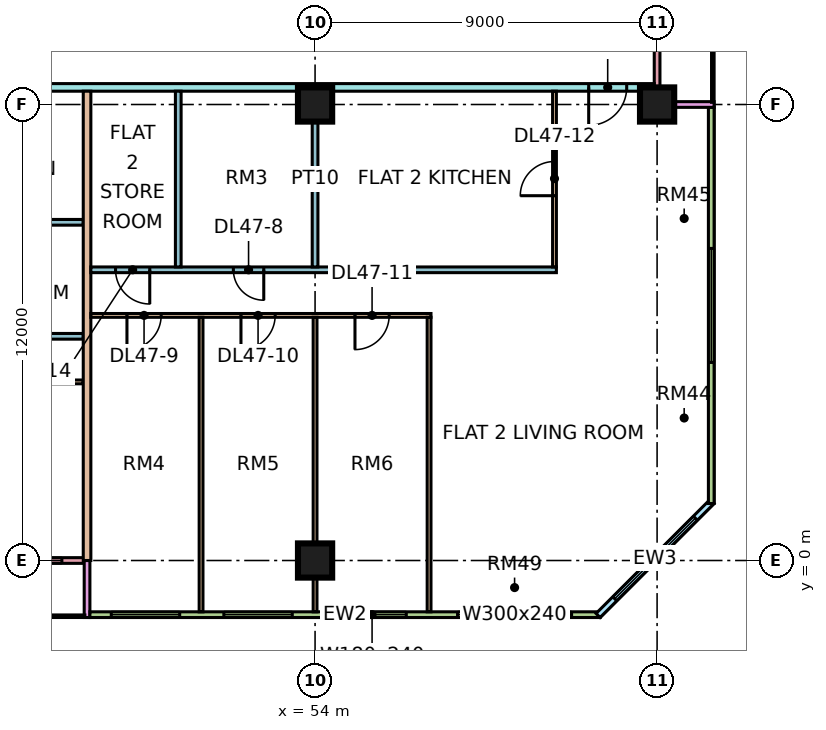
"""IFC4 building model, lengths in metres.
Left out: names, types, materials, properties, quantities, classifications, styles, units other than length and angle.
Written with IfcOpenShell. Run it as: python <this file> out.ifc"""

import sys

from ifc_helpers import new_model, si_unit, direction, frame, frame_2d, origin, origin_2d, place, context, subcontext, project, spatial, rectangle, extrude, element, fill, save


model = new_model("IFC4")
c1 = context("Model", 3, precision=1e-05, world=origin(), true_north=direction((0.0, 1.0)))
c2 = subcontext(c1, "Body", "Model", "MODEL_VIEW")
j1 = project(units=[si_unit("LENGTHUNIT", "METRE"), si_unit("PLANEANGLEUNIT", "RADIAN")], contexts=[c1])
p1 = place(None, origin())
s1 = spatial("IfcSite", under=j1, at=p1, CompositionType="ELEMENT")
p2 = place(p1, origin())
s2 = spatial("IfcBuilding", under=s1, at=p2, CompositionType="ELEMENT")
p3 = place(p2, frame((0.0, 0.0, 202.4)))
s3 = spatial("IfcBuildingStorey", under=s2, at=p3, CompositionType="ELEMENT", Elevation=202.4)
for number, where, z_axis, x_axis in (
    (1, (54.0, 0.0, 0.0), (0.0, 0.0, 1.0), (1.0, 0.0, 0.0)),
    (2, (54.0, 12.0, 0.0), (0.0, 0.0, 1.0), (1.0, 0.0, 0.0)),
    (3, (63.0, 12.0, 0.0), (0.0, 0.0, 1.0), (1.0, 0.0, 0.0)),
):
    element("IfcColumn", number, at=place(p3, frame(where, z_axis=z_axis, x_axis=x_axis)), inside=s3, PredefinedType="COLUMN", context=c2, shape_type="SweptSolid", body=[
        extrude(rectangle(XDim=0.9, YDim=0.9, at=origin_2d()), origin(), (0.0, 0.0, 1.0), 3.75),
    ])
p4 = place(p3, frame((36.075, 0.0, 0.0), z_axis=(0.0, 0.0, 1.0), x_axis=(1.0, 0.0, 0.0)))
e4 = element("IfcWall", 4, at=p4, inside=s3, PredefinedType="SOLIDWALL", context=c2, shape_type="SweptSolid", body=[
    extrude(rectangle(XDim=11.85, YDim=0.15, at=frame_2d((5.925, 0.0))), origin(), (0.0, 0.0, 1.0), 3.3),
])
p5 = place(p4, frame((1.1, 0.0, 0.0)))
e5 = element("IfcOpeningElement", 5, at=p5, cuts=e4, PredefinedType="OPENING", context=c2, shape_type="SweptSolid", body=[
    extrude(rectangle(XDim=1.2, YDim=2.4, at=frame_2d((0.6, 1.2))), frame((0.0, 0.085, 0.0), z_axis=(0.0, -1.0, 0.0), x_axis=(1.0, 0.0, 0.0)), (0.0, 0.0, 1.0), 0.17),
])
p6 = place(p4, frame((4.15, 0.0, 0.45)))
e6 = element("IfcOpeningElement", 6, at=p6, cuts=e4, PredefinedType="OPENING", context=c2, shape_type="SweptSolid", body=[
    extrude(rectangle(XDim=3.0, YDim=2.4, at=frame_2d((1.5, 1.2))), frame((0.0, 0.085, 0.0), z_axis=(0.0, -1.0, 0.0), x_axis=(1.0, 0.0, 0.0)), (0.0, 0.0, 1.0), 0.17),
])
p7 = place(p4, frame((10.062, 0.0, 0.45)))
e7 = element("IfcOpeningElement", 7, at=p7, cuts=e4, PredefinedType="OPENING", context=c2, shape_type="SweptSolid", body=[
    extrude(rectangle(XDim=1.2, YDim=2.4, at=frame_2d((0.6, 1.2))), frame((0.0, 0.085, 0.0), z_axis=(0.0, -1.0, 0.0), x_axis=(1.0, 0.0, 0.0)), (0.0, 0.0, 1.0), 0.17),
])
p8 = place(p3, frame((48.0, -1.5, 0.0), z_axis=(0.0, 0.0, 1.0), x_axis=(0.0, 1.0, 0.0)))
e8 = element("IfcWall", 8, at=p8, inside=s3, PredefinedType="SOLIDWALL", context=c2, shape_type="SweptSolid", body=[
    extrude(rectangle(XDim=1.5, YDim=0.15, at=frame_2d((0.75, 0.0))), origin(), (0.0, 0.0, 1.0), 3.3),
])
p9 = place(p3, frame((48.075, -1.425, 0.0), z_axis=(0.0, 0.0, 1.0), x_axis=(1.0, 0.0, 0.0)))
e9 = element("IfcWall", 9, at=p9, inside=s3, PredefinedType="SOLIDWALL", context=c2, shape_type="SweptSolid", body=[
    extrude(rectangle(XDim=13.425, YDim=0.15, at=frame_2d((6.712, 0.0))), origin(), (0.0, 0.0, 1.0), 3.3),
])
p10 = place(p9, frame((0.562, 0.0, 0.45)))
e10 = element("IfcOpeningElement", 10, at=p10, cuts=e9, PredefinedType="OPENING", context=c2, shape_type="SweptSolid", body=[
    extrude(rectangle(XDim=1.8, YDim=2.4, at=frame_2d((0.9, 1.2))), frame((0.0, 0.085, 0.0), z_axis=(0.0, -1.0, 0.0), x_axis=(1.0, 0.0, 0.0)), (0.0, 0.0, 1.0), 0.17),
])
p11 = place(p9, frame((3.525, 0.0, 0.45)))
e11 = element("IfcOpeningElement", 11, at=p11, cuts=e9, PredefinedType="OPENING", context=c2, shape_type="SweptSolid", body=[
    extrude(rectangle(XDim=1.8, YDim=2.4, at=frame_2d((0.9, 1.2))), frame((0.0, 0.085, 0.0), z_axis=(0.0, -1.0, 0.0), x_axis=(1.0, 0.0, 0.0)), (0.0, 0.0, 1.0), 0.17),
])
p12 = place(p9, frame((6.525, 0.0, 0.45)))
e12 = element("IfcOpeningElement", 12, at=p12, cuts=e9, PredefinedType="OPENING", context=c2, shape_type="SweptSolid", body=[
    extrude(rectangle(XDim=1.8, YDim=2.4, at=frame_2d((0.9, 1.2))), frame((0.0, 0.085, 0.0), z_axis=(0.0, -1.0, 0.0), x_axis=(1.0, 0.0, 0.0)), (0.0, 0.0, 1.0), 0.17),
])
p13 = place(p9, frame((9.675, 0.0, 0.45)))
e13 = element("IfcOpeningElement", 13, at=p13, cuts=e9, PredefinedType="OPENING", context=c2, shape_type="SweptSolid", body=[
    extrude(rectangle(XDim=3.0, YDim=2.4, at=frame_2d((1.5, 1.2))), frame((0.0, 0.085, 0.0), z_axis=(0.0, -1.0, 0.0), x_axis=(1.0, 0.0, 0.0)), (0.0, 0.0, 1.0), 0.17),
])
p14 = place(p3, frame((61.447, -1.447, 0.0), z_axis=(0.0, 0.0, 1.0), x_axis=(0.707106781187, 0.707106781187, 0.0)))
e14 = element("IfcWall", 14, at=p14, inside=s3, PredefinedType="SOLIDWALL", context=c2, shape_type="SweptSolid", body=[
    extrude(rectangle(XDim=4.243, YDim=0.15, at=frame_2d((2.121, 0.0))), origin(), (0.0, 0.0, 1.0), 3.3),
])
p15 = place(p14, frame((0.621, 0.0, 0.45)))
e15 = element("IfcOpeningElement", 15, at=p15, cuts=e14, PredefinedType="OPENING", context=c2, shape_type="SweptSolid", body=[
    extrude(rectangle(XDim=3.0, YDim=2.4, at=frame_2d((1.5, 1.2))), frame((0.0, 0.085, 0.0), z_axis=(0.0, -1.0, 0.0), x_axis=(1.0, 0.0, 0.0)), (0.0, 0.0, 1.0), 0.17),
])
p16 = place(p3, frame((64.425, 1.5, 0.0), z_axis=(0.0, 0.0, 1.0), x_axis=(0.0, 1.0, 0.0)))
e16 = element("IfcWall", 16, at=p16, inside=s3, PredefinedType="SOLIDWALL", context=c2, shape_type="SweptSolid", body=[
    extrude(rectangle(XDim=10.425, YDim=0.15, at=frame_2d((5.212, 0.0))), origin(), (0.0, 0.0, 1.0), 3.3),
])
p17 = place(p16, frame((3.712, 0.0, 0.45)))
e17 = element("IfcOpeningElement", 17, at=p17, cuts=e16, PredefinedType="OPENING", context=c2, shape_type="SweptSolid", body=[
    extrude(rectangle(XDim=3.0, YDim=2.4, at=frame_2d((1.5, 1.2))), frame((0.0, 0.085, 0.0), z_axis=(0.0, -1.0, 0.0), x_axis=(1.0, 0.0, 0.0)), (0.0, 0.0, 1.0), 0.17),
])
p18 = place(p3, frame((63.0, 12.075, 0.0), z_axis=(0.0, 0.0, 1.0), x_axis=(0.0, 1.0, 0.0)))
e18 = element("IfcWall", 18, at=p18, inside=s3, PredefinedType="SOLIDWALL", context=c2, shape_type="SweptSolid", body=[
    extrude(rectangle(XDim=10.35, YDim=0.15, at=frame_2d((5.175, 0.0))), origin(), (0.0, 0.0, 1.0), 3.3),
])
p19 = place(p18, frame((4.125, 0.0, 0.45)))
e19 = element("IfcOpeningElement", 19, at=p19, cuts=e18, PredefinedType="OPENING", context=c2, shape_type="SweptSolid", body=[
    extrude(rectangle(XDim=1.8, YDim=2.4, at=frame_2d((0.9, 1.2))), frame((0.0, 0.085, 0.0), z_axis=(0.0, -1.0, 0.0), x_axis=(1.0, 0.0, 0.0)), (0.0, 0.0, 1.0), 0.17),
])
p20 = place(p18, frame((8.137, 0.0, 0.45)))
e20 = element("IfcOpeningElement", 20, at=p20, cuts=e18, PredefinedType="OPENING", context=c2, shape_type="SweptSolid", body=[
    extrude(rectangle(XDim=1.8, YDim=2.4, at=frame_2d((0.9, 1.2))), frame((0.0, 0.085, 0.0), z_axis=(0.0, -1.0, 0.0), x_axis=(1.0, 0.0, 0.0)), (0.0, 0.0, 1.0), 0.17),
])
p21 = place(p3, frame((64.5, 12.0, 0.0), z_axis=(0.0, 0.0, 1.0), x_axis=(-1.0, 0.0, 0.0)))
e21 = element("IfcWall", 21, at=p21, inside=s3, PredefinedType="SOLIDWALL", context=c2, shape_type="SweptSolid", body=[
    extrude(rectangle(XDim=1.5, YDim=0.15, at=frame_2d((0.75, 0.0))), origin(), (0.0, 0.0, 1.0), 3.3),
])
p22 = place(p3, frame((33.05, 4.7, 0.0), z_axis=(0.0, 0.0, 1.0), x_axis=(1.0, 0.0, 0.0)))
e22 = element("IfcWall", 22, at=p22, inside=s3, PredefinedType="PARTITIONING", context=c2, shape_type="SweptSolid", body=[
    extrude(rectangle(XDim=14.85, YDim=0.1, at=frame_2d((7.425, 0.0))), origin(), (0.0, 0.0, 1.0), 3.3),
])
p23 = place(p22, frame((1.0, 0.0, 0.0)))
e23 = element("IfcOpeningElement", 23, at=p23, cuts=e22, PredefinedType="OPENING", context=c2, shape_type="SweptSolid", body=[
    extrude(rectangle(XDim=0.9, YDim=2.1, at=frame_2d((0.45, 1.05))), frame((0.0, 0.06, 0.0), z_axis=(0.0, -1.0, 0.0), x_axis=(1.0, 0.0, 0.0)), (0.0, 0.0, 1.0), 0.12),
])
p24 = place(p22, frame((4.0, 0.0, 0.0)))
e24 = element("IfcOpeningElement", 24, at=p24, cuts=e22, PredefinedType="OPENING", context=c2, shape_type="SweptSolid", body=[
    extrude(rectangle(XDim=0.9, YDim=2.1, at=frame_2d((0.45, 1.05))), frame((0.0, 0.06, 0.0), z_axis=(0.0, -1.0, 0.0), x_axis=(1.0, 0.0, 0.0)), (0.0, 0.0, 1.0), 0.12),
])
p25 = place(p22, frame((10.0, 0.0, 0.0)))
e25 = element("IfcOpeningElement", 25, at=p25, cuts=e22, PredefinedType="OPENING", context=c2, shape_type="SweptSolid", body=[
    extrude(rectangle(XDim=0.9, YDim=2.1, at=frame_2d((0.45, 1.05))), frame((0.0, 0.06, 0.0), z_axis=(0.0, -1.0, 0.0), x_axis=(1.0, 0.0, 0.0)), (0.0, 0.0, 1.0), 0.12),
])
p26 = place(p3, frame((40.65, 12.45, 0.0), z_axis=(0.0, 0.0, 1.0), x_axis=(1.0, 0.0, 0.0)))
e26 = element("IfcWall", 26, at=p26, inside=s3, PredefinedType="PARTITIONING", context=c2, shape_type="SweptSolid", body=[
    extrude(rectangle(XDim=22.276, YDim=0.2, at=frame_2d((11.138, 0.0))), origin(), (0.0, 0.0, 1.0), 3.3),
])
p27 = place(p26, frame((20.55, 0.0, 0.0)))
e27 = element("IfcOpeningElement", 27, at=p27, cuts=e26, PredefinedType="OPENING", context=c2, shape_type="SweptSolid", body=[
    extrude(rectangle(XDim=1.0, YDim=2.1, at=frame_2d((0.5, 1.05))), frame((0.0, 0.11, 0.0), z_axis=(0.0, -1.0, 0.0), x_axis=(1.0, 0.0, 0.0)), (0.0, 0.0, 1.0), 0.22),
])
p28 = place(p26, frame((1.05, 0.0, 0.0)))
e28 = element("IfcOpeningElement", 28, at=p28, cuts=e26, PredefinedType="OPENING", context=c2, shape_type="SweptSolid", body=[
    extrude(rectangle(XDim=1.0, YDim=2.1, at=frame_2d((0.5, 1.05))), frame((0.0, 0.11, 0.0), z_axis=(0.0, -1.0, 0.0), x_axis=(1.0, 0.0, 0.0)), (0.0, 0.0, 1.0), 0.22),
])
p29 = place(p3, frame((43.725, 5.9, 0.0), z_axis=(0.0, 0.0, 1.0), x_axis=(1.0, 0.0, 0.0)))
e29 = element("IfcWall", 29, at=p29, inside=s3, PredefinedType="PARTITIONING", context=c2, shape_type="SweptSolid", body=[
    extrude(rectangle(XDim=4.175, YDim=0.15, at=frame_2d((2.087, 0.0))), origin(), (0.0, 0.0, 1.0), 3.3),
])
p30 = place(p29, frame((1.675, 0.0, 0.0)))
e30 = element("IfcOpeningElement", 30, at=p30, cuts=e29, PredefinedType="OPENING", context=c2, shape_type="SweptSolid", body=[
    extrude(rectangle(XDim=0.8, YDim=2.1, at=frame_2d((0.4, 1.05))), frame((0.0, 0.085, 0.0), z_axis=(0.0, -1.0, 0.0), x_axis=(1.0, 0.0, 0.0)), (0.0, 0.0, 1.0), 0.17),
])
p31 = place(p3, frame((43.725, 8.9, 0.0), z_axis=(0.0, 0.0, 1.0), x_axis=(1.0, 0.0, 0.0)))
e31 = element("IfcWall", 31, at=p31, inside=s3, PredefinedType="PARTITIONING", context=c2, shape_type="SweptSolid", body=[
    extrude(rectangle(XDim=4.175, YDim=0.15, at=frame_2d((2.087, 0.0))), origin(), (0.0, 0.0, 1.0), 3.3),
])
p32 = place(p3, frame((48.0, 0.0, 0.0), z_axis=(0.0, 0.0, 1.0), x_axis=(0.0, 1.0, 0.0)))
e32 = element("IfcWall", 32, at=p32, inside=s3, PredefinedType="PARTITIONING", context=c2, shape_type="SweptSolid", body=[
    extrude(rectangle(XDim=12.35, YDim=0.2, at=frame_2d((6.175, 0.0))), origin(), (0.0, 0.0, 1.0), 3.3),
])
p33 = place(p3, frame((48.1, 6.45, 0.0), z_axis=(0.0, 0.0, 1.0), x_axis=(1.0, 0.0, 0.0)))
e33 = element("IfcWall", 33, at=p33, inside=s3, PredefinedType="PARTITIONING", context=c2, shape_type="SweptSolid", body=[
    extrude(rectangle(XDim=8.95, YDim=0.1, at=frame_2d((4.475, 0.0))), origin(), (0.0, 0.0, 1.0), 3.3),
])
p34 = place(p33, frame((0.95, 0.0, 0.0)))
e34 = element("IfcOpeningElement", 34, at=p34, cuts=e33, PredefinedType="OPENING", context=c2, shape_type="SweptSolid", body=[
    extrude(rectangle(XDim=0.9, YDim=2.1, at=frame_2d((0.45, 1.05))), frame((0.0, 0.06, 0.0), z_axis=(0.0, -1.0, 0.0), x_axis=(1.0, 0.0, 0.0)), (0.0, 0.0, 1.0), 0.12),
])
p35 = place(p33, frame((3.95, 0.0, 0.0)))
e35 = element("IfcOpeningElement", 35, at=p35, cuts=e33, PredefinedType="OPENING", context=c2, shape_type="SweptSolid", body=[
    extrude(rectangle(XDim=0.9, YDim=2.1, at=frame_2d((0.45, 1.05))), frame((0.0, 0.06, 0.0), z_axis=(0.0, -1.0, 0.0), x_axis=(1.0, 0.0, 0.0)), (0.0, 0.0, 1.0), 0.12),
])
p36 = place(p33, frame((6.95, 0.0, 0.0)))
e36 = element("IfcOpeningElement", 36, at=p36, cuts=e33, PredefinedType="OPENING", context=c2, shape_type="SweptSolid", body=[
    extrude(rectangle(XDim=0.9, YDim=2.1, at=frame_2d((0.45, 1.05))), frame((0.0, 0.06, 0.0), z_axis=(0.0, -1.0, 0.0), x_axis=(1.0, 0.0, 0.0)), (0.0, 0.0, 1.0), 0.12),
])
p37 = place(p3, frame((48.1, 7.65, 0.0), z_axis=(0.0, 0.0, 1.0), x_axis=(1.0, 0.0, 0.0)))
e37 = element("IfcWall", 37, at=p37, inside=s3, PredefinedType="PARTITIONING", context=c2, shape_type="SweptSolid", body=[
    extrude(rectangle(XDim=12.25, YDim=0.15, at=frame_2d((6.125, 0.0))), origin(), (0.0, 0.0, 1.0), 3.3),
])
p38 = place(p37, frame((3.75, 0.0, 0.0)))
e38 = element("IfcOpeningElement", 38, at=p38, cuts=e37, PredefinedType="OPENING", context=c2, shape_type="SweptSolid", body=[
    extrude(rectangle(XDim=0.8, YDim=2.1, at=frame_2d((0.4, 1.05))), frame((0.0, 0.085, 0.0), z_axis=(0.0, -1.0, 0.0), x_axis=(1.0, 0.0, 0.0)), (0.0, 0.0, 1.0), 0.17),
])
p39 = place(p37, frame((0.65, 0.0, 0.0)))
e39 = element("IfcOpeningElement", 39, at=p39, cuts=e37, PredefinedType="OPENING", context=c2, shape_type="SweptSolid", body=[
    extrude(rectangle(XDim=0.9, YDim=2.1, at=frame_2d((0.45, 1.05))), frame((0.0, 0.085, 0.0), z_axis=(0.0, -1.0, 0.0), x_axis=(1.0, 0.0, 0.0)), (0.0, 0.0, 1.0), 0.17),
])
p40 = place(p3, frame((50.4, 7.725, 0.0), z_axis=(0.0, 0.0, 1.0), x_axis=(0.0, 1.0, 0.0)))
e40 = element("IfcWall", 40, at=p40, inside=s3, PredefinedType="PARTITIONING", context=c2, shape_type="SweptSolid", body=[
    extrude(rectangle(XDim=4.625, YDim=0.15, at=frame_2d((2.312, 0.0))), origin(), (0.0, 0.0, 1.0), 3.3),
])
for number, where, z_axis, x_axis in (
    (41, (51.0, -1.351, 0.0), (0.0, 0.0, 1.0), (0.0, 1.0, 0.0)),
    (42, (54.0, -1.351, 0.0), (0.0, 0.0, 1.0), (0.0, 1.0, 0.0)),
):
    element("IfcWall", number, at=place(p3, frame(where, z_axis=z_axis, x_axis=x_axis)), inside=s3, PredefinedType="PARTITIONING", context=c2, shape_type="SweptSolid", body=[
        extrude(rectangle(XDim=7.751, YDim=0.1, at=frame_2d((3.875, 0.0))), origin(), (0.0, 0.0, 1.0), 3.3),
    ])
p41 = place(p3, frame((54.0, 7.725, 0.0), z_axis=(0.0, 0.0, 1.0), x_axis=(0.0, 1.0, 0.0)))
e43 = element("IfcWall", 43, at=p41, inside=s3, PredefinedType="PARTITIONING", context=c2, shape_type="SweptSolid", body=[
    extrude(rectangle(XDim=4.625, YDim=0.15, at=frame_2d((2.312, 0.0))), origin(), (0.0, 0.0, 1.0), 3.3),
])
p42 = place(p3, frame((57.0, -1.35, 0.0), z_axis=(0.0, 0.0, 1.0), x_axis=(0.0, 1.0, 0.0)))
e44 = element("IfcWall", 44, at=p42, inside=s3, PredefinedType="PARTITIONING", context=c2, shape_type="SweptSolid", body=[
    extrude(rectangle(XDim=7.75, YDim=0.1, at=frame_2d((3.875, 0.0))), origin(), (0.0, 0.0, 1.0), 3.3),
])
p43 = place(p3, frame((60.3, 7.725, 0.0), z_axis=(0.0, 0.0, 1.0), x_axis=(0.0, 1.0, 0.0)))
e45 = element("IfcWall", 45, at=p43, inside=s3, PredefinedType="PARTITIONING", context=c2, shape_type="SweptSolid", body=[
    extrude(rectangle(XDim=4.625, YDim=0.1, at=frame_2d((2.312, 0.0))), origin(), (0.0, 0.0, 1.0), 3.3),
])
p44 = place(p43, frame((1.875, 0.0, 0.0)))
e46 = element("IfcOpeningElement", 46, at=p44, cuts=e45, PredefinedType="OPENING", context=c2, shape_type="SweptSolid", body=[
    extrude(rectangle(XDim=0.9, YDim=2.1, at=frame_2d((0.45, 1.05))), frame((0.0, 0.06, 0.0), z_axis=(0.0, -1.0, 0.0), x_axis=(1.0, 0.0, 0.0)), (0.0, 0.0, 1.0), 0.12),
])
p45 = place(p7, origin())
e47 = element("IfcWindow", 47, at=p45, inside=s3, PartitioningType="SINGLE_PANEL", PredefinedType="WINDOW", context=c2, shape_type="SweptSolid", body=[
    extrude(rectangle(XDim=1.2, YDim=2.4, at=frame_2d((0.6, 1.2))), frame((0.0, 0.03, 0.0), z_axis=(0.0, -1.0, 0.0), x_axis=(1.0, 0.0, 0.0)), (0.0, 0.0, 1.0), 0.06),
])
fill(e7, e47)
p46 = place(p10, origin())
e48 = element("IfcWindow", 48, at=p46, inside=s3, PartitioningType="SINGLE_PANEL", PredefinedType="WINDOW", context=c2, shape_type="SweptSolid", body=[
    extrude(rectangle(XDim=1.8, YDim=2.4, at=frame_2d((0.9, 1.2))), frame((0.0, 0.03, 0.0), z_axis=(0.0, -1.0, 0.0), x_axis=(1.0, 0.0, 0.0)), (0.0, 0.0, 1.0), 0.06),
])
fill(e10, e48)
p47 = place(p11, origin())
e49 = element("IfcWindow", 49, at=p47, inside=s3, PartitioningType="SINGLE_PANEL", PredefinedType="WINDOW", context=c2, shape_type="SweptSolid", body=[
    extrude(rectangle(XDim=1.8, YDim=2.4, at=frame_2d((0.9, 1.2))), frame((0.0, 0.03, 0.0), z_axis=(0.0, -1.0, 0.0), x_axis=(1.0, 0.0, 0.0)), (0.0, 0.0, 1.0), 0.06),
])
fill(e11, e49)
p48 = place(p12, origin())
e50 = element("IfcWindow", 50, at=p48, inside=s3, PartitioningType="SINGLE_PANEL", PredefinedType="WINDOW", context=c2, shape_type="SweptSolid", body=[
    extrude(rectangle(XDim=1.8, YDim=2.4, at=frame_2d((0.9, 1.2))), frame((0.0, 0.03, 0.0), z_axis=(0.0, -1.0, 0.0), x_axis=(1.0, 0.0, 0.0)), (0.0, 0.0, 1.0), 0.06),
])
fill(e12, e50)
p49 = place(p13, origin())
e51 = element("IfcWindow", 51, at=p49, inside=s3, PartitioningType="SINGLE_PANEL", PredefinedType="WINDOW", context=c2, shape_type="SweptSolid", body=[
    extrude(rectangle(XDim=3.0, YDim=2.4, at=frame_2d((1.5, 1.2))), frame((0.0, 0.03, 0.0), z_axis=(0.0, -1.0, 0.0), x_axis=(1.0, 0.0, 0.0)), (0.0, 0.0, 1.0), 0.06),
])
fill(e13, e51)
p50 = place(p15, origin())
e52 = element("IfcWindow", 52, at=p50, inside=s3, PartitioningType="SINGLE_PANEL", PredefinedType="WINDOW", context=c2, shape_type="SweptSolid", body=[
    extrude(rectangle(XDim=3.0, YDim=2.4, at=frame_2d((1.5, 1.2))), frame((0.0, 0.03, 0.0), z_axis=(0.0, -1.0, 0.0), x_axis=(1.0, 0.0, 0.0)), (0.0, 0.0, 1.0), 0.06),
])
fill(e15, e52)
p51 = place(p17, origin())
e53 = element("IfcWindow", 53, at=p51, inside=s3, PartitioningType="SINGLE_PANEL", PredefinedType="WINDOW", context=c2, shape_type="SweptSolid", body=[
    extrude(rectangle(XDim=3.0, YDim=2.4, at=frame_2d((1.5, 1.2))), frame((0.0, 0.03, 0.0), z_axis=(0.0, -1.0, 0.0), x_axis=(1.0, 0.0, 0.0)), (0.0, 0.0, 1.0), 0.06),
])
fill(e17, e53)
p52 = place(p38, origin())
e54 = element("IfcDoor", 54, at=p52, inside=s3, OperationType="SINGLE_SWING_RIGHT", PredefinedType="DOOR", context=c2, shape_type="SweptSolid", body=[
    extrude(rectangle(XDim=0.8, YDim=2.1, at=frame_2d((0.4, 1.05))), frame((0.0, 0.025, 0.0), z_axis=(0.0, -1.0, 0.0), x_axis=(1.0, 0.0, 0.0)), (0.0, 0.0, 1.0), 0.05),
])
fill(e38, e54)
p53 = place(p34, frame((0.9, 0.0, 0.0), z_axis=(0.0, 0.0, 1.0), x_axis=(-1.0, 0.0, 0.0)))
e55 = element("IfcDoor", 55, at=p53, inside=s3, OperationType="SINGLE_SWING_LEFT", PredefinedType="DOOR", context=c2, shape_type="SweptSolid", body=[
    extrude(rectangle(XDim=0.9, YDim=2.1, at=frame_2d((0.45, 1.05))), frame((0.0, 0.025, 0.0), z_axis=(0.0, -1.0, 0.0), x_axis=(1.0, 0.0, 0.0)), (0.0, 0.0, 1.0), 0.05),
])
fill(e34, e55)
p54 = place(p35, frame((0.9, 0.0, 0.0), z_axis=(0.0, 0.0, 1.0), x_axis=(-1.0, 0.0, 0.0)))
e56 = element("IfcDoor", 56, at=p54, inside=s3, OperationType="SINGLE_SWING_LEFT", PredefinedType="DOOR", context=c2, shape_type="SweptSolid", body=[
    extrude(rectangle(XDim=0.9, YDim=2.1, at=frame_2d((0.45, 1.05))), frame((0.0, 0.025, 0.0), z_axis=(0.0, -1.0, 0.0), x_axis=(1.0, 0.0, 0.0)), (0.0, 0.0, 1.0), 0.05),
])
fill(e35, e56)
p55 = place(p36, frame((0.9, 0.0, 0.0), z_axis=(0.0, 0.0, 1.0), x_axis=(-1.0, 0.0, 0.0)))
e57 = element("IfcDoor", 57, at=p55, inside=s3, OperationType="SINGLE_SWING_LEFT", PredefinedType="DOOR", context=c2, shape_type="SweptSolid", body=[
    extrude(rectangle(XDim=0.9, YDim=2.1, at=frame_2d((0.45, 1.05))), frame((0.0, 0.025, 0.0), z_axis=(0.0, -1.0, 0.0), x_axis=(1.0, 0.0, 0.0)), (0.0, 0.0, 1.0), 0.05),
])
fill(e36, e57)
p56 = place(p44, origin())
e58 = element("IfcDoor", 58, at=p56, inside=s3, OperationType="SINGLE_SWING_LEFT", PredefinedType="DOOR", context=c2, shape_type="SweptSolid", body=[
    extrude(rectangle(XDim=0.9, YDim=2.1, at=frame_2d((0.45, 1.05))), frame((0.0, 0.025, 0.0), z_axis=(0.0, -1.0, 0.0), x_axis=(1.0, 0.0, 0.0)), (0.0, 0.0, 1.0), 0.05),
])
fill(e46, e58)
p57 = place(p27, frame((1.0, 0.0, 0.0), z_axis=(0.0, 0.0, 1.0), x_axis=(-1.0, 0.0, 0.0)))
e59 = element("IfcDoor", 59, at=p57, inside=s3, OperationType="SINGLE_SWING_LEFT", PredefinedType="DOOR", context=c2, shape_type="SweptSolid", body=[
    extrude(rectangle(XDim=1.0, YDim=2.1, at=frame_2d((0.5, 1.05))), frame((0.0, 0.025, 0.0), z_axis=(0.0, -1.0, 0.0), x_axis=(1.0, 0.0, 0.0)), (0.0, 0.0, 1.0), 0.05),
])
fill(e27, e59)
p58 = place(p39, origin())
e60 = element("IfcDoor", 60, at=p58, inside=s3, OperationType="SINGLE_SWING_RIGHT", PredefinedType="DOOR", context=c2, shape_type="SweptSolid", body=[
    extrude(rectangle(XDim=0.9, YDim=2.1, at=frame_2d((0.45, 1.05))), frame((0.0, 0.025, 0.0), z_axis=(0.0, -1.0, 0.0), x_axis=(1.0, 0.0, 0.0)), (0.0, 0.0, 1.0), 0.05),
])
fill(e39, e60)
save(model, sys.argv[1])
